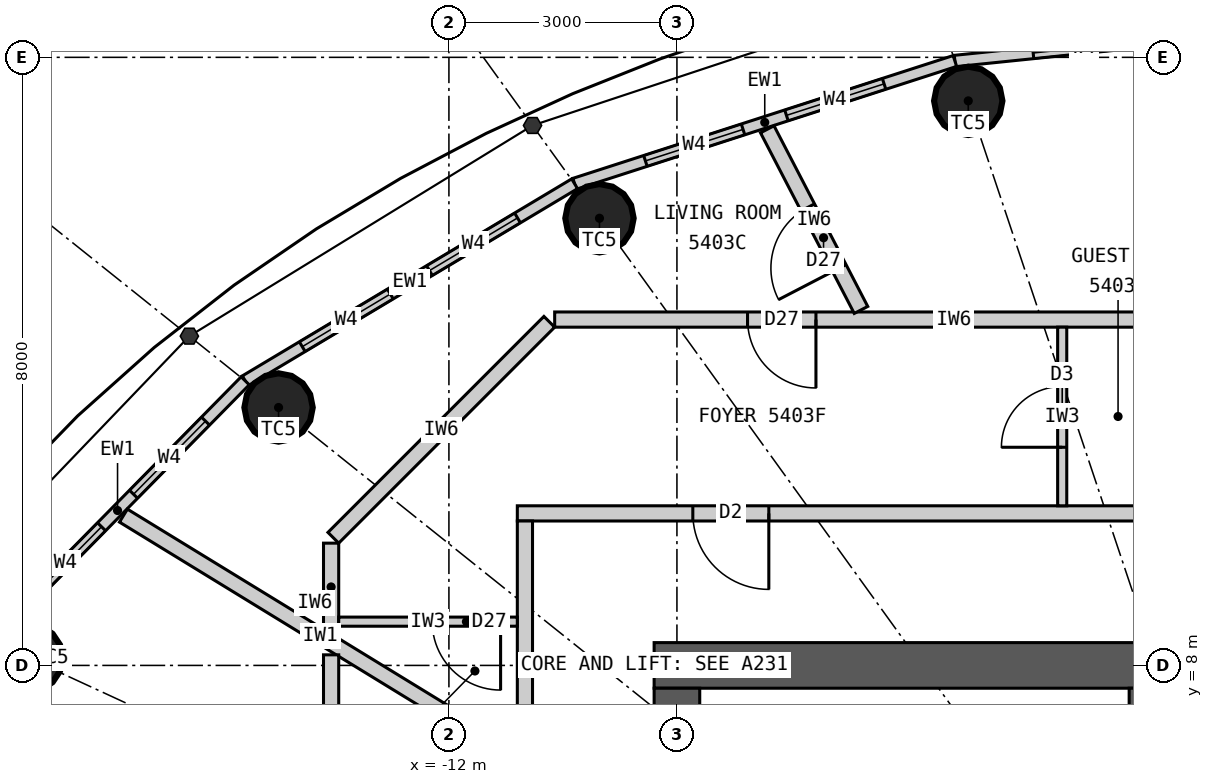
"""IFC4 building model, lengths in metres.
Left out: names, types, materials, properties, quantities, classifications, styles, units other than length and angle.
Written with IfcOpenShell. Run it as: python <this file> out.ifc"""

import sys

from ifc_helpers import new_model, si_unit, direction, frame, frame_2d, origin, origin_2d, place, context, subcontext, project, spatial, rectangle, circle, extrude, element, fill, save


model = new_model("IFC4")
c1 = context("Model", 3, precision=1e-05, world=origin(), true_north=direction((0.0, 1.0)))
c2 = subcontext(c1, "Body", "Model", "MODEL_VIEW")
j1 = project(units=[si_unit("LENGTHUNIT", "METRE"), si_unit("PLANEANGLEUNIT", "RADIAN")], contexts=[c1])
p1 = place(None, origin())
s1 = spatial("IfcSite", under=j1, at=p1, CompositionType="ELEMENT")
p2 = place(p1, origin())
s2 = spatial("IfcBuilding", under=s1, at=p2, CompositionType="ELEMENT")
p3 = place(p2, frame((0.0, 0.0, 202.8)))
s3 = spatial("IfcBuildingStorey", under=s2, at=p3, CompositionType="ELEMENT", Elevation=202.8)
for number, where, z_axis, x_axis in (
    (1, (-5.167, 15.427, 0.0), (0.0, 0.0, 1.0), (1.0, 0.0, 0.0)),
    (2, (-10.019, 13.883, 0.0), (0.0, 0.0, 1.0), (1.0, 0.0, 0.0)),
    (3, (-14.241, 11.393, 0.0), (0.0, 0.0, 1.0), (1.0, 0.0, 0.0)),
    (4, (-17.532, 8.098, 0.0), (0.0, 0.0, 1.0), (1.0, 0.0, 0.0)),
):
    element("IfcColumn", number, at=place(p3, frame(where, z_axis=z_axis, x_axis=x_axis)), inside=s3, PredefinedType="COLUMN", context=c2, shape_type="SweptSolid", body=[
        extrude(circle(Radius=0.45, at=origin_2d()), origin(), (0.0, 0.0, 1.0), 3.3),
    ])
p4 = place(p3, frame((-9.3, 8.0, 0.0), z_axis=(0.0, 0.0, 1.0), x_axis=(1.0, 0.0, 0.0)))
e5 = element("IfcWall", 5, at=p4, inside=s3, PredefinedType="SHEAR", context=c2, shape_type="SweptSolid", body=[
    extrude(rectangle(XDim=18.6, YDim=0.6, at=frame_2d((9.3, 0.0))), origin(), (0.0, 0.0, 1.0), 3.3),
])
p5 = place(p4, frame((8.0, 0.0, 0.0)))
e6 = element("IfcOpeningElement", 6, at=p5, cuts=e5, PredefinedType="OPENING", context=c2, shape_type="SweptSolid", body=[
    extrude(rectangle(XDim=1.2, YDim=2.2, at=frame_2d((0.6, 1.1))), frame((0.0, 0.31, 0.0), z_axis=(0.0, -1.0, 0.0), x_axis=(1.0, 0.0, 0.0)), (0.0, 0.0, 1.0), 0.62),
])
p6 = place(p4, frame((15.6, 0.0, 0.0)))
e7 = element("IfcOpeningElement", 7, at=p6, cuts=e5, PredefinedType="OPENING", context=c2, shape_type="SweptSolid", body=[
    extrude(rectangle(XDim=0.9, YDim=2.2, at=frame_2d((0.45, 1.1))), frame((0.0, 0.31, 0.0), z_axis=(0.0, -1.0, 0.0), x_axis=(1.0, 0.0, 0.0)), (0.0, 0.0, 1.0), 0.62),
])
p7 = place(p3, frame((-9.0, 7.7, 0.0), z_axis=(0.0, 0.0, 1.0), x_axis=(0.0, -1.0, 0.0)))
e8 = element("IfcWall", 8, at=p7, inside=s3, PredefinedType="SHEAR", context=c2, shape_type="SweptSolid", body=[
    extrude(rectangle(XDim=15.4, YDim=0.6, at=frame_2d((7.7, 0.0))), origin(), (0.0, 0.0, 1.0), 3.3),
])
p8 = place(p7, frame((6.8, 0.0, 0.0)))
e9 = element("IfcOpeningElement", 9, at=p8, cuts=e8, PredefinedType="OPENING", context=c2, shape_type="SweptSolid", body=[
    extrude(rectangle(XDim=1.8, YDim=2.2, at=frame_2d((0.9, 1.1))), frame((0.0, 0.31, 0.0), z_axis=(0.0, -1.0, 0.0), x_axis=(1.0, 0.0, 0.0)), (0.0, 0.0, 1.0), 0.62),
])
p9 = place(p3, frame((-2.75, 4.5, 0.0), z_axis=(0.0, 0.0, 1.0), x_axis=(0.0, 1.0, 0.0)))
e10 = element("IfcWall", 10, at=p9, inside=s3, PredefinedType="SHEAR", context=c2, shape_type="SweptSolid", body=[
    extrude(rectangle(XDim=3.2, YDim=0.6, at=frame_2d((1.6, 0.0))), origin(), (0.0, 0.0, 1.0), 3.3),
])
p10 = place(p9, frame((0.925, 0.0, 0.0)))
e11 = element("IfcOpeningElement", 11, at=p10, cuts=e10, PredefinedType="OPENING", context=c2, shape_type="SweptSolid", body=[
    extrude(rectangle(XDim=1.1, YDim=2.2, at=frame_2d((0.55, 1.1))), frame((0.0, 0.31, 0.0), z_axis=(0.0, -1.0, 0.0), x_axis=(1.0, 0.0, 0.0)), (0.0, 0.0, 1.0), 0.62),
])
p11 = place(p3, frame((0.0, 16.5, 0.0), z_axis=(0.0, 0.0, 1.0), x_axis=(-0.994774574972, -0.102095763818, 0.0)))
e12 = element("IfcWall", 12, at=p11, inside=s3, PredefinedType="ELEMENTEDWALL", context=c2, shape_type="SweptSolid", body=[
    extrude(rectangle(XDim=5.371, YDim=0.15, at=frame_2d((2.686, 0.0))), origin(), (0.0, 0.0, 1.0), 3.12),
])
p12 = place(p11, frame((1.035, 0.0, 0.9)))
e13 = element("IfcOpeningElement", 13, at=p12, cuts=e12, PredefinedType="OPENING", context=c2, shape_type="SweptSolid", body=[
    extrude(rectangle(XDim=1.35, YDim=1.9, at=frame_2d((0.675, 0.95))), frame((0.0, 0.085, 0.0), z_axis=(0.0, -1.0, 0.0), x_axis=(1.0, 0.0, 0.0)), (0.0, 0.0, 1.0), 0.17),
])
p13 = place(p11, frame((2.985, 0.0, 0.9)))
e14 = element("IfcOpeningElement", 14, at=p13, cuts=e12, PredefinedType="OPENING", context=c2, shape_type="SweptSolid", body=[
    extrude(rectangle(XDim=1.35, YDim=1.9, at=frame_2d((0.675, 0.95))), frame((0.0, 0.085, 0.0), z_axis=(0.0, -1.0, 0.0), x_axis=(1.0, 0.0, 0.0)), (0.0, 0.0, 1.0), 0.17),
])
p14 = place(p3, frame((-5.343, 15.952, 0.0), z_axis=(0.0, 0.0, 1.0), x_axis=(-0.951644702515, -0.307200846638, 0.0)))
e15 = element("IfcWall", 15, at=p14, inside=s3, PredefinedType="ELEMENTEDWALL", context=c2, shape_type="SweptSolid", body=[
    extrude(rectangle(XDim=5.258, YDim=0.15, at=frame_2d((2.629, 0.0))), origin(), (0.0, 0.0, 1.0), 3.12),
])
p15 = place(p14, frame((0.979, 0.0, 0.9)))
e16 = element("IfcOpeningElement", 16, at=p15, cuts=e15, PredefinedType="OPENING", context=c2, shape_type="SweptSolid", body=[
    extrude(rectangle(XDim=1.35, YDim=1.9, at=frame_2d((0.675, 0.95))), frame((0.0, 0.085, 0.0), z_axis=(0.0, -1.0, 0.0), x_axis=(1.0, 0.0, 0.0)), (0.0, 0.0, 1.0), 0.17),
])
p16 = place(p14, frame((2.929, 0.0, 0.9)))
e17 = element("IfcOpeningElement", 17, at=p16, cuts=e15, PredefinedType="OPENING", context=c2, shape_type="SweptSolid", body=[
    extrude(rectangle(XDim=1.35, YDim=1.9, at=frame_2d((0.675, 0.95))), frame((0.0, 0.085, 0.0), z_axis=(0.0, -1.0, 0.0), x_axis=(1.0, 0.0, 0.0)), (0.0, 0.0, 1.0), 0.17),
])
p17 = place(p3, frame((-10.346, 14.336, 0.0), z_axis=(0.0, 0.0, 1.0), x_axis=(-0.85822150553, -0.513279502265, 0.0)))
e18 = element("IfcWall", 18, at=p17, inside=s3, PredefinedType="ELEMENTEDWALL", context=c2, shape_type="SweptSolid", body=[
    extrude(rectangle(XDim=5.05, YDim=0.15, at=frame_2d((2.525, 0.0))), origin(), (0.0, 0.0, 1.0), 3.12),
])
p18 = place(p17, frame((0.875, 0.0, 0.9)))
e19 = element("IfcOpeningElement", 19, at=p18, cuts=e18, PredefinedType="OPENING", context=c2, shape_type="SweptSolid", body=[
    extrude(rectangle(XDim=1.35, YDim=1.9, at=frame_2d((0.675, 0.95))), frame((0.0, 0.085, 0.0), z_axis=(0.0, -1.0, 0.0), x_axis=(1.0, 0.0, 0.0)), (0.0, 0.0, 1.0), 0.17),
])
p19 = place(p17, frame((2.825, 0.0, 0.9)))
e20 = element("IfcOpeningElement", 20, at=p19, cuts=e18, PredefinedType="OPENING", context=c2, shape_type="SweptSolid", body=[
    extrude(rectangle(XDim=1.35, YDim=1.9, at=frame_2d((0.675, 0.95))), frame((0.0, 0.085, 0.0), z_axis=(0.0, -1.0, 0.0), x_axis=(1.0, 0.0, 0.0)), (0.0, 0.0, 1.0), 0.17),
])
p20 = place(p3, frame((-14.68, 11.744, 0.0), z_axis=(0.0, 0.0, 1.0), x_axis=(-0.701527379618, -0.712642501993, 0.0)))
e21 = element("IfcWall", 21, at=p20, inside=s3, PredefinedType="ELEMENTEDWALL", context=c2, shape_type="SweptSolid", body=[
    extrude(rectangle(XDim=4.788, YDim=0.15, at=frame_2d((2.394, 0.0))), origin(), (0.0, 0.0, 1.0), 3.12),
])
p21 = place(p20, frame((0.744, 0.0, 0.9)))
e22 = element("IfcOpeningElement", 22, at=p21, cuts=e21, PredefinedType="OPENING", context=c2, shape_type="SweptSolid", body=[
    extrude(rectangle(XDim=1.35, YDim=1.9, at=frame_2d((0.675, 0.95))), frame((0.0, 0.085, 0.0), z_axis=(0.0, -1.0, 0.0), x_axis=(1.0, 0.0, 0.0)), (0.0, 0.0, 1.0), 0.17),
])
p22 = place(p20, frame((2.694, 0.0, 0.9)))
e23 = element("IfcOpeningElement", 23, at=p22, cuts=e21, PredefinedType="OPENING", context=c2, shape_type="SweptSolid", body=[
    extrude(rectangle(XDim=1.35, YDim=1.9, at=frame_2d((0.675, 0.95))), frame((0.0, 0.085, 0.0), z_axis=(0.0, -1.0, 0.0), x_axis=(1.0, 0.0, 0.0)), (0.0, 0.0, 1.0), 0.17),
])
p23 = place(p3, frame((-11.1, 10.0, 0.0), z_axis=(0.0, 0.0, 1.0), x_axis=(1.0, 0.0, 0.0)))
e24 = element("IfcWall", 24, at=p23, inside=s3, PredefinedType="PARTITIONING", context=c2, shape_type="SweptSolid", body=[
    extrude(rectangle(XDim=22.2, YDim=0.2, at=frame_2d((11.1, 0.0))), origin(), (0.0, 0.0, 1.0), 3.12),
])
p24 = place(p23, frame((2.309, 0.0, 0.0)))
e25 = element("IfcOpeningElement", 25, at=p24, cuts=e24, PredefinedType="OPENING", context=c2, shape_type="SweptSolid", body=[
    extrude(rectangle(XDim=1.0, YDim=2.2, at=frame_2d((0.5, 1.1))), frame((0.0, 0.11, 0.0), z_axis=(0.0, -1.0, 0.0), x_axis=(1.0, 0.0, 0.0)), (0.0, 0.0, 1.0), 0.22),
])
p25 = place(p3, frame((-11.0, 9.9, 0.0), z_axis=(0.0, 0.0, 1.0), x_axis=(0.0, -1.0, 0.0)))
e26 = element("IfcWall", 26, at=p25, inside=s3, PredefinedType="PARTITIONING", context=c2, shape_type="SweptSolid", body=[
    extrude(rectangle(XDim=7.416, YDim=0.2, at=frame_2d((3.708, 0.0))), origin(), (0.0, 0.0, 1.0), 3.12),
])
p26 = place(p3, frame((-11.1, 6.797, 0.0), z_axis=(0.0, 0.0, 1.0), x_axis=(-0.852799818179, 0.522237943963, 0.0)))
e27 = element("IfcWall", 27, at=p26, inside=s3, PredefinedType="PARTITIONING", context=c2, shape_type="SweptSolid", body=[
    extrude(rectangle(XDim=6.077, YDim=0.2, at=frame_2d((3.039, 0.0))), origin(), (0.0, 0.0, 1.0), 3.12),
])
p27 = place(p3, frame((-0.101, 12.55, 0.0), z_axis=(0.0, 0.0, 1.0), x_axis=(-1.0, 0.0, 0.0)))
e28 = element("IfcWall", 28, at=p27, inside=s3, PredefinedType="PARTITIONING", context=c2, shape_type="SweptSolid", body=[
    extrude(rectangle(XDim=10.508, YDim=0.2, at=frame_2d((5.254, 0.0))), origin(), (0.0, 0.0, 1.0), 3.12),
])
p28 = place(p27, frame((1.4, 0.0, 0.0)))
e29 = element("IfcOpeningElement", 29, at=p28, cuts=e28, PredefinedType="OPENING", context=c2, shape_type="SweptSolid", body=[
    extrude(rectangle(XDim=0.8, YDim=2.1, at=frame_2d((0.4, 1.05))), frame((0.0, 0.11, 0.0), z_axis=(0.0, -1.0, 0.0), x_axis=(1.0, 0.0, 0.0)), (0.0, 0.0, 1.0), 0.22),
])
p29 = place(p27, frame((7.07, 0.0, 0.0)))
e30 = element("IfcOpeningElement", 30, at=p29, cuts=e28, PredefinedType="OPENING", context=c2, shape_type="SweptSolid", body=[
    extrude(rectangle(XDim=0.9, YDim=2.1, at=frame_2d((0.45, 1.05))), frame((0.0, 0.11, 0.0), z_axis=(0.0, -1.0, 0.0), x_axis=(1.0, 0.0, 0.0)), (0.0, 0.0, 1.0), 0.22),
])
p30 = place(p3, frame((-10.679, 12.521, 0.0), z_axis=(0.0, 0.0, 1.0), x_axis=(-0.707106781187, -0.707106781187, 0.0)))
e31 = element("IfcWall", 31, at=p30, inside=s3, PredefinedType="PARTITIONING", context=c2, shape_type="SweptSolid", body=[
    extrude(rectangle(XDim=4.019, YDim=0.2, at=frame_2d((2.009, 0.0))), origin(), (0.0, 0.0, 1.0), 3.12),
])
p31 = place(p3, frame((-13.55, 9.609, 0.0), z_axis=(0.0, 0.0, 1.0), x_axis=(0.0, -1.0, 0.0)))
e32 = element("IfcWall", 32, at=p31, inside=s3, PredefinedType="PARTITIONING", context=c2, shape_type="SweptSolid", body=[
    extrude(rectangle(XDim=1.153, YDim=0.2, at=frame_2d((0.576, 0.0))), origin(), (0.0, 0.0, 1.0), 3.12),
])
p32 = place(p3, frame((-6.578, 12.677, 0.0), z_axis=(0.0, 0.0, 1.0), x_axis=(-0.460620531465, 0.887597164255, 0.0)))
e33 = element("IfcWall", 33, at=p32, inside=s3, PredefinedType="PARTITIONING", context=c2, shape_type="SweptSolid", body=[
    extrude(rectangle(XDim=2.678, YDim=0.2, at=frame_2d((1.339, 0.0))), origin(), (0.0, 0.0, 1.0), 3.12),
])
p33 = place(p32, frame((0.62, 0.0, 0.0)))
e34 = element("IfcOpeningElement", 34, at=p33, cuts=e33, PredefinedType="OPENING", context=c2, shape_type="SweptSolid", body=[
    extrude(rectangle(XDim=0.9, YDim=2.1, at=frame_2d((0.45, 1.05))), frame((0.0, 0.11, 0.0), z_axis=(0.0, -1.0, 0.0), x_axis=(1.0, 0.0, 0.0)), (0.0, 0.0, 1.0), 0.22),
])
p34 = place(p3, frame((-3.931, 10.1, 0.0), z_axis=(0.0, 0.0, 1.0), x_axis=(0.0, 1.0, 0.0)))
e35 = element("IfcWall", 35, at=p34, inside=s3, PredefinedType="PARTITIONING", context=c2, shape_type="SweptSolid", body=[
    extrude(rectangle(XDim=2.35, YDim=0.12, at=frame_2d((1.175, 0.0))), origin(), (0.0, 0.0, 1.0), 3.12),
])
p35 = place(p34, frame((0.77, 0.0, 0.0)))
e36 = element("IfcOpeningElement", 36, at=p35, cuts=e35, PredefinedType="OPENING", context=c2, shape_type="SweptSolid", body=[
    extrude(rectangle(XDim=0.8, YDim=2.1, at=frame_2d((0.4, 1.05))), frame((0.0, 0.07, 0.0), z_axis=(0.0, -1.0, 0.0), x_axis=(1.0, 0.0, 0.0)), (0.0, 0.0, 1.0), 0.14),
])
p36 = place(p3, frame((-11.1, 8.576, 0.0), z_axis=(0.0, 0.0, 1.0), x_axis=(-1.0, 0.0, 0.0)))
e37 = element("IfcWall", 37, at=p36, inside=s3, PredefinedType="PARTITIONING", context=c2, shape_type="SweptSolid", body=[
    extrude(rectangle(XDim=2.35, YDim=0.12, at=frame_2d((1.175, 0.0))), origin(), (0.0, 0.0, 1.0), 3.12),
])
p37 = place(p36, frame((0.22, 0.0, 0.0)))
e38 = element("IfcOpeningElement", 38, at=p37, cuts=e37, PredefinedType="OPENING", context=c2, shape_type="SweptSolid", body=[
    extrude(rectangle(XDim=0.9, YDim=2.1, at=frame_2d((0.45, 1.05))), frame((0.0, 0.07, 0.0), z_axis=(0.0, -1.0, 0.0), x_axis=(1.0, 0.0, 0.0)), (0.0, 0.0, 1.0), 0.14),
])
p38 = place(p3, frame((-13.55, 8.139, 0.0), z_axis=(0.0, 0.0, 1.0), x_axis=(0.0, -1.0, 0.0)))
e39 = element("IfcWall", 39, at=p38, inside=s3, PredefinedType="PARTITIONING", context=c2, shape_type="SweptSolid", body=[
    extrude(rectangle(XDim=12.496, YDim=0.2, at=frame_2d((6.248, 0.0))), origin(), (0.0, 0.0, 1.0), 3.12),
])
p39 = place(p38, frame((2.42, 0.0, 0.0)))
e40 = element("IfcOpeningElement", 40, at=p39, cuts=e39, PredefinedType="OPENING", context=c2, shape_type="SweptSolid", body=[
    extrude(rectangle(XDim=0.8, YDim=2.1, at=frame_2d((0.4, 1.05))), frame((0.0, 0.11, 0.0), z_axis=(0.0, -1.0, 0.0), x_axis=(1.0, 0.0, 0.0)), (0.0, 0.0, 1.0), 0.22),
])
p40 = place(p38, frame((9.776, 0.0, 0.0)))
e41 = element("IfcOpeningElement", 41, at=p40, cuts=e39, PredefinedType="OPENING", context=c2, shape_type="SweptSolid", body=[
    extrude(rectangle(XDim=0.8, YDim=2.1, at=frame_2d((0.4, 1.05))), frame((0.0, 0.11, 0.0), z_axis=(0.0, -1.0, 0.0), x_axis=(1.0, 0.0, 0.0)), (0.0, 0.0, 1.0), 0.22),
])
p41 = place(p38, frame((5.82, 0.0, 0.0)))
e42 = element("IfcOpeningElement", 42, at=p41, cuts=e39, PredefinedType="OPENING", context=c2, shape_type="SweptSolid", body=[
    extrude(rectangle(XDim=0.9, YDim=2.1, at=frame_2d((0.45, 1.05))), frame((0.0, 0.11, 0.0), z_axis=(0.0, -1.0, 0.0), x_axis=(1.0, 0.0, 0.0)), (0.0, 0.0, 1.0), 0.22),
])
p42 = place(p13, origin())
e43 = element("IfcWindow", 43, at=p42, inside=s3, PartitioningType="SINGLE_PANEL", PredefinedType="WINDOW", context=c2, shape_type="SweptSolid", body=[
    extrude(rectangle(XDim=1.35, YDim=1.9, at=frame_2d((0.675, 0.95))), frame((0.0, 0.03, 0.0), z_axis=(0.0, -1.0, 0.0), x_axis=(1.0, 0.0, 0.0)), (0.0, 0.0, 1.0), 0.06),
])
fill(e14, e43)
p43 = place(p15, origin())
e44 = element("IfcWindow", 44, at=p43, inside=s3, PartitioningType="SINGLE_PANEL", PredefinedType="WINDOW", context=c2, shape_type="SweptSolid", body=[
    extrude(rectangle(XDim=1.35, YDim=1.9, at=frame_2d((0.675, 0.95))), frame((0.0, 0.03, 0.0), z_axis=(0.0, -1.0, 0.0), x_axis=(1.0, 0.0, 0.0)), (0.0, 0.0, 1.0), 0.06),
])
fill(e16, e44)
p44 = place(p16, origin())
e45 = element("IfcWindow", 45, at=p44, inside=s3, PartitioningType="SINGLE_PANEL", PredefinedType="WINDOW", context=c2, shape_type="SweptSolid", body=[
    extrude(rectangle(XDim=1.35, YDim=1.9, at=frame_2d((0.675, 0.95))), frame((0.0, 0.03, 0.0), z_axis=(0.0, -1.0, 0.0), x_axis=(1.0, 0.0, 0.0)), (0.0, 0.0, 1.0), 0.06),
])
fill(e17, e45)
p45 = place(p18, origin())
e46 = element("IfcWindow", 46, at=p45, inside=s3, PartitioningType="SINGLE_PANEL", PredefinedType="WINDOW", context=c2, shape_type="SweptSolid", body=[
    extrude(rectangle(XDim=1.35, YDim=1.9, at=frame_2d((0.675, 0.95))), frame((0.0, 0.03, 0.0), z_axis=(0.0, -1.0, 0.0), x_axis=(1.0, 0.0, 0.0)), (0.0, 0.0, 1.0), 0.06),
])
fill(e19, e46)
p46 = place(p19, origin())
e47 = element("IfcWindow", 47, at=p46, inside=s3, PartitioningType="SINGLE_PANEL", PredefinedType="WINDOW", context=c2, shape_type="SweptSolid", body=[
    extrude(rectangle(XDim=1.35, YDim=1.9, at=frame_2d((0.675, 0.95))), frame((0.0, 0.03, 0.0), z_axis=(0.0, -1.0, 0.0), x_axis=(1.0, 0.0, 0.0)), (0.0, 0.0, 1.0), 0.06),
])
fill(e20, e47)
p47 = place(p21, origin())
e48 = element("IfcWindow", 48, at=p47, inside=s3, PartitioningType="SINGLE_PANEL", PredefinedType="WINDOW", context=c2, shape_type="SweptSolid", body=[
    extrude(rectangle(XDim=1.35, YDim=1.9, at=frame_2d((0.675, 0.95))), frame((0.0, 0.03, 0.0), z_axis=(0.0, -1.0, 0.0), x_axis=(1.0, 0.0, 0.0)), (0.0, 0.0, 1.0), 0.06),
])
fill(e22, e48)
p48 = place(p22, origin())
e49 = element("IfcWindow", 49, at=p48, inside=s3, PartitioningType="SINGLE_PANEL", PredefinedType="WINDOW", context=c2, shape_type="SweptSolid", body=[
    extrude(rectangle(XDim=1.35, YDim=1.9, at=frame_2d((0.675, 0.95))), frame((0.0, 0.03, 0.0), z_axis=(0.0, -1.0, 0.0), x_axis=(1.0, 0.0, 0.0)), (0.0, 0.0, 1.0), 0.06),
])
fill(e23, e49)
p49 = place(p24, origin())
e50 = element("IfcDoor", 50, at=p49, inside=s3, OperationType="SINGLE_SWING_RIGHT", PredefinedType="DOOR", context=c2, shape_type="SweptSolid", body=[
    extrude(rectangle(XDim=1.0, YDim=2.2, at=frame_2d((0.5, 1.1))), frame((0.0, 0.025, 0.0), z_axis=(0.0, -1.0, 0.0), x_axis=(1.0, 0.0, 0.0)), (0.0, 0.0, 1.0), 0.05),
])
fill(e25, e50)
p50 = place(p35, origin())
e51 = element("IfcDoor", 51, at=p50, inside=s3, OperationType="SINGLE_SWING_LEFT", PredefinedType="DOOR", context=c2, shape_type="SweptSolid", body=[
    extrude(rectangle(XDim=0.8, YDim=2.1, at=frame_2d((0.4, 1.05))), frame((0.0, 0.025, 0.0), z_axis=(0.0, -1.0, 0.0), x_axis=(1.0, 0.0, 0.0)), (0.0, 0.0, 1.0), 0.05),
])
fill(e36, e51)
p51 = place(p37, origin())
e52 = element("IfcDoor", 52, at=p51, inside=s3, OperationType="SINGLE_SWING_LEFT", PredefinedType="DOOR", context=c2, shape_type="SweptSolid", body=[
    extrude(rectangle(XDim=0.9, YDim=2.1, at=frame_2d((0.45, 1.05))), frame((0.0, 0.025, 0.0), z_axis=(0.0, -1.0, 0.0), x_axis=(1.0, 0.0, 0.0)), (0.0, 0.0, 1.0), 0.05),
])
fill(e38, e52)
p52 = place(p29, origin())
e53 = element("IfcDoor", 53, at=p52, inside=s3, OperationType="SINGLE_SWING_LEFT", PredefinedType="DOOR", context=c2, shape_type="SweptSolid", body=[
    extrude(rectangle(XDim=0.9, YDim=2.1, at=frame_2d((0.45, 1.05))), frame((0.0, 0.025, 0.0), z_axis=(0.0, -1.0, 0.0), x_axis=(1.0, 0.0, 0.0)), (0.0, 0.0, 1.0), 0.05),
])
fill(e30, e53)
p53 = place(p33, origin())
e54 = element("IfcDoor", 54, at=p53, inside=s3, OperationType="SINGLE_SWING_LEFT", PredefinedType="DOOR", context=c2, shape_type="SweptSolid", body=[
    extrude(rectangle(XDim=0.9, YDim=2.1, at=frame_2d((0.45, 1.05))), frame((0.0, 0.025, 0.0), z_axis=(0.0, -1.0, 0.0), x_axis=(1.0, 0.0, 0.0)), (0.0, 0.0, 1.0), 0.05),
])
fill(e34, e54)
save(model, sys.argv[1])
